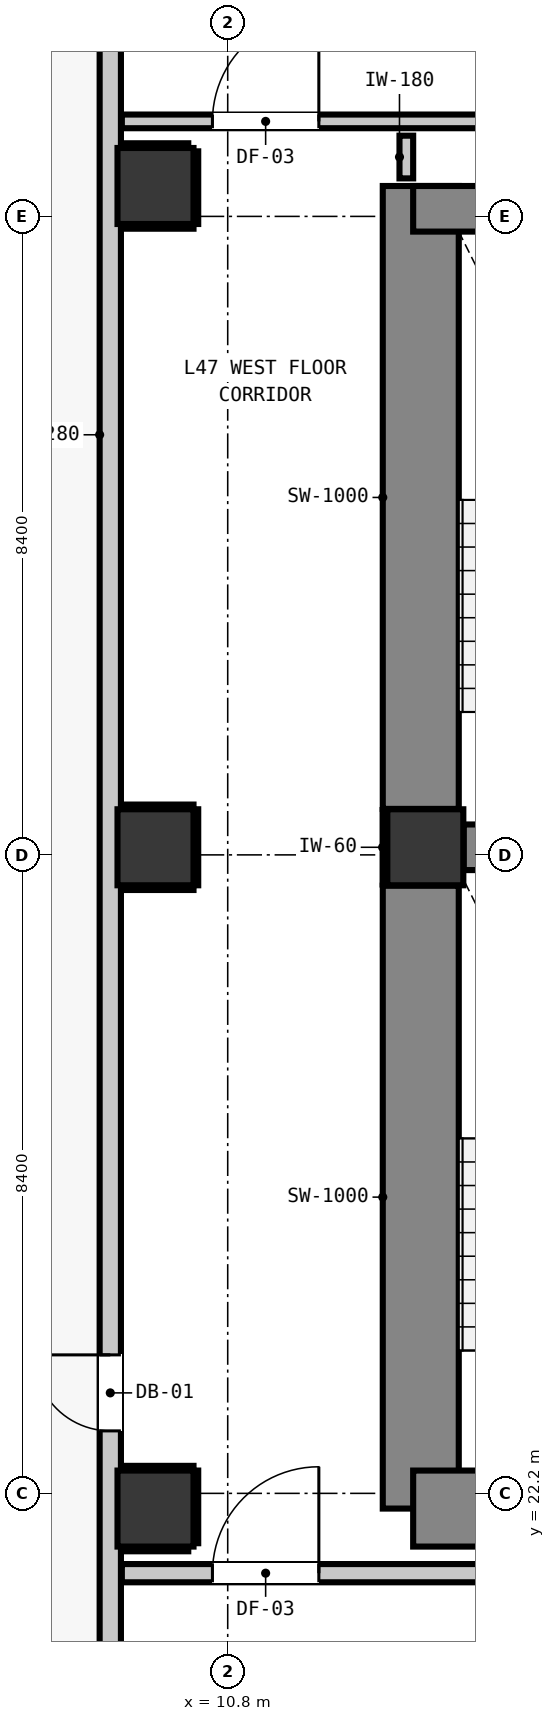
"""IFC4 building model, lengths in metres.
Left out: names, types, materials, properties, quantities, classifications, styles, units other than length and angle.
Written with IfcOpenShell. Run it as: python <this file> out.ifc"""

import sys

from ifc_helpers import new_model, si_unit, direction, frame, frame_2d, origin, origin_2d, place, context, subcontext, project, spatial, rectangle, extrude, element, fill, save


model = new_model("IFC4")
c1 = context("Model", 3, precision=1e-05, world=origin(), true_north=direction((0.0, 1.0)))
c2 = subcontext(c1, "Body", "Model", "MODEL_VIEW")
j1 = project(units=[si_unit("LENGTHUNIT", "METRE"), si_unit("PLANEANGLEUNIT", "RADIAN")], contexts=[c1])
p1 = place(None, origin())
s1 = spatial("IfcSite", under=j1, at=p1, CompositionType="ELEMENT")
p2 = place(p1, origin())
s2 = spatial("IfcBuilding", under=s1, at=p2, CompositionType="ELEMENT")
p3 = place(p2, frame((0.0, 0.0, 162.52)))
s3 = spatial("IfcBuildingStorey", under=s2, at=p3, CompositionType="ELEMENT", Elevation=162.52)
p4 = place(p3, frame((13.4, 30.7, 0.0), z_axis=(0.0, 0.0, 1.0), x_axis=(1.0, 0.0, 0.0)))
e1 = element("IfcColumn", 1, at=p4, inside=s3, PredefinedType="COLUMN", context=c2, shape_type="SweptSolid", body=[
    extrude(rectangle(XDim=1.0, YDim=1.0, at=origin_2d()), origin(), (0.0, 0.0, 1.0), 3.32),
])
p5 = place(p3, frame((13.34, 22.0, 0.0), z_axis=(0.0, 0.0, 1.0), x_axis=(0.0, 1.0, 0.0)))
e2 = element("IfcWall", 2, at=p5, inside=s3, PredefinedType="SHEAR", context=c2, shape_type="SweptSolid", body=[
    extrude(rectangle(XDim=8.195, YDim=1.0, at=frame_2d((4.098, 0.0))), origin(), (0.0, 0.0, 1.0), 3.32),
])
p6 = place(p3, frame((13.34, 31.205, 0.0), z_axis=(0.0, 0.0, 1.0), x_axis=(0.0, 1.0, 0.0)))
e3 = element("IfcWall", 3, at=p6, inside=s3, PredefinedType="SHEAR", context=c2, shape_type="SweptSolid", body=[
    extrude(rectangle(XDim=8.195, YDim=1.0, at=frame_2d((4.097, 0.0))), origin(), (0.0, 0.0, 1.0), 3.32),
])
p7 = place(p3, frame((13.24, 22.0, 0.0), z_axis=(0.0, 0.0, 1.0), x_axis=(1.0, 0.0, 0.0)))
e4 = element("IfcWall", 4, at=p7, inside=s3, PredefinedType="SHEAR", context=c2, shape_type="SweptSolid", body=[
    extrude(rectangle(XDim=4.08, YDim=1.0, at=frame_2d((2.04, 0.0))), origin(), (0.0, 0.0, 1.0), 3.32),
])
p8 = place(p3, frame((13.24, 39.1, 0.0), z_axis=(0.0, 0.0, 1.0), x_axis=(1.0, 0.0, 0.0)))
e5 = element("IfcWall", 5, at=p8, inside=s3, PredefinedType="SHEAR", context=c2, shape_type="SweptSolid", body=[
    extrude(rectangle(XDim=4.08, YDim=0.6, at=frame_2d((2.04, 0.0))), origin(), (0.0, 0.0, 1.0), 3.32),
])
p9 = place(p3, frame((13.905, 30.7, 0.0), z_axis=(0.0, 0.0, 1.0), x_axis=(1.0, 0.0, 0.0)))
e6 = element("IfcWall", 6, at=p9, inside=s3, PredefinedType="SHEAR", context=c2, shape_type="SweptSolid", body=[
    extrude(rectangle(XDim=3.415, YDim=0.6, at=frame_2d((1.708, 0.0))), origin(), (0.0, 0.0, 1.0), 3.32),
])
for number, where, z_axis, x_axis in (
    (7, (9.85, 22.0, 0.0), (0.0, 0.0, 1.0), (1.0, 0.0, 0.0)),
    (8, (9.85, 30.7, 0.0), (0.0, 0.0, 1.0), (1.0, 0.0, 0.0)),
    (9, (9.85, 39.4, 0.0), (0.0, 0.0, 1.0), (1.0, 0.0, 0.0)),
):
    element("IfcColumn", number, at=place(p3, frame(where, z_axis=z_axis, x_axis=x_axis)), inside=s3, PredefinedType="COLUMN", context=c2, shape_type="SweptSolid", body=[
        extrude(rectangle(XDim=1.0, YDim=1.0, at=origin_2d()), origin(), (0.0, 0.0, 1.0), 2.9),
    ])
p10 = place(p3, frame((9.255, 17.555, 0.0), z_axis=(0.0, 0.0, 1.0), x_axis=(0.0, 1.0, 0.0)))
e10 = element("IfcWall", 10, at=p10, inside=s3, PredefinedType="STANDARD", context=c2, shape_type="SweptSolid", body=[
    extrude(rectangle(XDim=32.29, YDim=0.28, at=frame_2d((16.145, 0.0))), origin(), (0.0, 0.0, 1.0), 2.9),
])
p11 = place(p10, frame((5.467, 0.0, 0.0)))
e11 = element("IfcOpeningElement", 11, at=p11, cuts=e10, PredefinedType="OPENING", context=c2, shape_type="SweptSolid", body=[
    extrude(rectangle(XDim=1.0, YDim=2.15, at=frame_2d((0.5, 1.075))), frame((0.0, 0.15, 0.0), z_axis=(0.0, -1.0, 0.0), x_axis=(1.0, 0.0, 0.0)), (0.0, 0.0, 1.0), 0.3),
])
p12 = place(p10, frame((0.342, 0.0, 0.85)))
e12 = element("IfcOpeningElement", 12, at=p12, cuts=e10, PredefinedType="OPENING", context=c2, shape_type="SweptSolid", body=[
    extrude(rectangle(XDim=1.2, YDim=1.8, at=frame_2d((0.6, 0.9))), frame((0.0, 0.15, 0.0), z_axis=(0.0, -1.0, 0.0), x_axis=(1.0, 0.0, 0.0)), (0.0, 0.0, 1.0), 0.3),
])
p13 = place(p10, frame((30.677, 0.0, 0.85)))
e13 = element("IfcOpeningElement", 13, at=p13, cuts=e10, PredefinedType="OPENING", context=c2, shape_type="SweptSolid", body=[
    extrude(rectangle(XDim=1.2, YDim=1.8, at=frame_2d((0.6, 0.9))), frame((0.0, 0.15, 0.0), z_axis=(0.0, -1.0, 0.0), x_axis=(1.0, 0.0, 0.0)), (0.0, 0.0, 1.0), 0.3),
])
p14 = place(p3, frame((9.407, 21.15, 0.0), z_axis=(0.0, 0.0, 1.0), x_axis=(1.0, 0.0, 0.0)))
e14 = element("IfcWall", 14, at=p14, inside=s3, PredefinedType="PARTITIONING", context=c2, shape_type="SweptSolid", body=[
    extrude(rectangle(XDim=39.386, YDim=0.24, at=frame_2d((19.693, 0.0))), origin(), (0.0, 0.0, 1.0), 2.9),
])
p15 = place(p14, frame((8.803, 0.0, 0.0)))
e15 = element("IfcOpeningElement", 15, at=p15, cuts=e14, PredefinedType="OPENING", context=c2, shape_type="SweptSolid", body=[
    extrude(rectangle(XDim=1.1, YDim=2.15, at=frame_2d((0.55, 1.075))), frame((0.0, 0.13, 0.0), z_axis=(0.0, -1.0, 0.0), x_axis=(1.0, 0.0, 0.0)), (0.0, 0.0, 1.0), 0.26),
])
p16 = place(p14, frame((1.192, 0.0, 0.0)))
e16 = element("IfcOpeningElement", 16, at=p16, cuts=e14, PredefinedType="OPENING", context=c2, shape_type="SweptSolid", body=[
    extrude(rectangle(XDim=1.4, YDim=2.15, at=frame_2d((0.7, 1.075))), frame((0.0, 0.13, 0.0), z_axis=(0.0, -1.0, 0.0), x_axis=(1.0, 0.0, 0.0)), (0.0, 0.0, 1.0), 0.26),
])
p17 = place(p14, frame((28.643, 0.0, 0.0)))
e17 = element("IfcOpeningElement", 17, at=p17, cuts=e14, PredefinedType="OPENING", context=c2, shape_type="SweptSolid", body=[
    extrude(rectangle(XDim=1.4, YDim=2.15, at=frame_2d((0.7, 1.075))), frame((0.0, 0.13, 0.0), z_axis=(0.0, -1.0, 0.0), x_axis=(1.0, 0.0, 0.0)), (0.0, 0.0, 1.0), 0.26),
])
p18 = place(p14, frame((34.394, 0.0, 0.0)))
e18 = element("IfcOpeningElement", 18, at=p18, cuts=e14, PredefinedType="OPENING", context=c2, shape_type="SweptSolid", body=[
    extrude(rectangle(XDim=0.9, YDim=2.1, at=frame_2d((0.45, 1.05))), frame((0.0, 0.13, 0.0), z_axis=(0.0, -1.0, 0.0), x_axis=(1.0, 0.0, 0.0)), (0.0, 0.0, 1.0), 0.26),
])
p19 = place(p3, frame((9.407, 40.25, 0.0), z_axis=(0.0, 0.0, 1.0), x_axis=(1.0, 0.0, 0.0)))
e19 = element("IfcWall", 19, at=p19, inside=s3, PredefinedType="PARTITIONING", context=c2, shape_type="SweptSolid", body=[
    extrude(rectangle(XDim=39.386, YDim=0.18, at=frame_2d((19.693, 0.0))), origin(), (0.0, 0.0, 1.0), 2.9),
])
p20 = place(p19, frame((8.028, 0.0, 0.0)))
e20 = element("IfcOpeningElement", 20, at=p20, cuts=e19, PredefinedType="OPENING", context=c2, shape_type="SweptSolid", body=[
    extrude(rectangle(XDim=1.4, YDim=2.15, at=frame_2d((0.7, 1.075))), frame((0.0, 0.1, 0.0), z_axis=(0.0, -1.0, 0.0), x_axis=(1.0, 0.0, 0.0)), (0.0, 0.0, 1.0), 0.2),
])
p21 = place(p19, frame((1.192, 0.0, 0.0)))
e21 = element("IfcOpeningElement", 21, at=p21, cuts=e19, PredefinedType="OPENING", context=c2, shape_type="SweptSolid", body=[
    extrude(rectangle(XDim=1.4, YDim=2.15, at=frame_2d((0.7, 1.075))), frame((0.0, 0.1, 0.0), z_axis=(0.0, -1.0, 0.0), x_axis=(1.0, 0.0, 0.0)), (0.0, 0.0, 1.0), 0.2),
])
p22 = place(p19, frame((28.643, 0.0, 0.0)))
e22 = element("IfcOpeningElement", 22, at=p22, cuts=e19, PredefinedType="OPENING", context=c2, shape_type="SweptSolid", body=[
    extrude(rectangle(XDim=1.4, YDim=2.15, at=frame_2d((0.7, 1.075))), frame((0.0, 0.1, 0.0), z_axis=(0.0, -1.0, 0.0), x_axis=(1.0, 0.0, 0.0)), (0.0, 0.0, 1.0), 0.2),
])
p23 = place(p19, frame((34.394, 0.0, 0.0)))
e23 = element("IfcOpeningElement", 23, at=p23, cuts=e19, PredefinedType="OPENING", context=c2, shape_type="SweptSolid", body=[
    extrude(rectangle(XDim=0.9, YDim=2.1, at=frame_2d((0.45, 1.05))), frame((0.0, 0.1, 0.0), z_axis=(0.0, -1.0, 0.0), x_axis=(1.0, 0.0, 0.0)), (0.0, 0.0, 1.0), 0.2),
])
p24 = place(p3, frame((13.15, 39.5, 0.0), z_axis=(0.0, 0.0, 1.0), x_axis=(0.0, 1.0, 0.0)))
e24 = element("IfcWall", 24, at=p24, inside=s3, PredefinedType="PARTITIONING", context=c2, shape_type="SweptSolid", body=[
    extrude(rectangle(XDim=0.562, YDim=0.18, at=frame_2d((0.281, 0.0))), origin(), (0.0, 0.0, 1.0), 0.905),
])
p25 = place(p3, frame((12.868, 30.21, 0.0), z_axis=(0.0, 0.0, 1.0), x_axis=(0.0, 1.0, 0.0)))
e25 = element("IfcWall", 25, at=p25, inside=s3, PredefinedType="PARTITIONING", context=c2, shape_type="SweptSolid", body=[
    extrude(rectangle(XDim=0.98, YDim=0.06, at=frame_2d((0.49, 0.0))), origin(), (0.0, 0.0, 1.0), 0.905),
])
p26 = place(p3, frame((9.41, 21.468, 0.0), z_axis=(0.0, 0.0, 1.0), x_axis=(1.0, 0.0, 0.0)))
e26 = element("IfcWall", 26, at=p26, inside=s3, PredefinedType="PARTITIONING", context=c2, shape_type="SweptSolid", body=[
    extrude(rectangle(XDim=0.871, YDim=0.06, at=frame_2d((0.436, 0.0))), origin(), (0.0, 0.0, 1.0), 0.905),
])
p27 = place(p3, frame((9.41, 22.532, 0.0), z_axis=(0.0, 0.0, 1.0), x_axis=(1.0, 0.0, 0.0)))
e27 = element("IfcWall", 27, at=p27, inside=s3, PredefinedType="PARTITIONING", context=c2, shape_type="SweptSolid", body=[
    extrude(rectangle(XDim=0.94, YDim=0.06, at=frame_2d((0.47, 0.0))), origin(), (0.0, 0.0, 1.0), 0.905),
])
p28 = place(p3, frame((10.382, 21.544, 0.0), z_axis=(0.0, 0.0, 1.0), x_axis=(0.0, 1.0, 0.0)))
e28 = element("IfcWall", 28, at=p28, inside=s3, PredefinedType="PARTITIONING", context=c2, shape_type="SweptSolid", body=[
    extrude(rectangle(XDim=0.956, YDim=0.06, at=frame_2d((0.478, 0.0))), origin(), (0.0, 0.0, 1.0), 1.45),
])
for number, where, z_axis, x_axis in (
    (29, (9.41, 30.168, 0.0), (0.0, 0.0, 1.0), (1.0, 0.0, 0.0)),
    (30, (9.41, 31.232, 0.0), (0.0, 0.0, 1.0), (1.0, 0.0, 0.0)),
):
    element("IfcWall", number, at=place(p3, frame(where, z_axis=z_axis, x_axis=x_axis)), inside=s3, PredefinedType="PARTITIONING", context=c2, shape_type="SweptSolid", body=[
        extrude(rectangle(XDim=0.94, YDim=0.06, at=frame_2d((0.47, 0.0))), origin(), (0.0, 0.0, 1.0), 0.905),
    ])
p29 = place(p3, frame((10.382, 30.2, 0.0), z_axis=(0.0, 0.0, 1.0), x_axis=(0.0, 1.0, 0.0)))
e31 = element("IfcWall", 31, at=p29, inside=s3, PredefinedType="PARTITIONING", context=c2, shape_type="SweptSolid", body=[
    extrude(rectangle(XDim=1.0, YDim=0.06, at=frame_2d((0.5, 0.0))), origin(), (0.0, 0.0, 1.0), 1.45),
])
p30 = place(p3, frame((9.41, 38.868, 0.0), z_axis=(0.0, 0.0, 1.0), x_axis=(1.0, 0.0, 0.0)))
e32 = element("IfcWall", 32, at=p30, inside=s3, PredefinedType="PARTITIONING", context=c2, shape_type="SweptSolid", body=[
    extrude(rectangle(XDim=0.94, YDim=0.06, at=frame_2d((0.47, 0.0))), origin(), (0.0, 0.0, 1.0), 0.905),
])
p31 = place(p3, frame((9.41, 39.932, 0.0), z_axis=(0.0, 0.0, 1.0), x_axis=(1.0, 0.0, 0.0)))
e33 = element("IfcWall", 33, at=p31, inside=s3, PredefinedType="PARTITIONING", context=c2, shape_type="SweptSolid", body=[
    extrude(rectangle(XDim=0.871, YDim=0.06, at=frame_2d((0.436, 0.0))), origin(), (0.0, 0.0, 1.0), 0.905),
])
p32 = place(p3, frame((10.382, 38.9, 0.0), z_axis=(0.0, 0.0, 1.0), x_axis=(0.0, 1.0, 0.0)))
e34 = element("IfcWall", 34, at=p32, inside=s3, PredefinedType="PARTITIONING", context=c2, shape_type="SweptSolid", body=[
    extrude(rectangle(XDim=0.956, YDim=0.06, at=frame_2d((0.478, 0.0))), origin(), (0.0, 0.0, 1.0), 1.45),
])
p33 = place(p11, origin())
e35 = element("IfcDoor", 35, at=p33, inside=s3, OperationType="SINGLE_SWING_RIGHT", PredefinedType="DOOR", context=c2, shape_type="SweptSolid", body=[
    extrude(rectangle(XDim=1.0, YDim=2.15, at=frame_2d((0.5, 1.075))), frame((0.0, 0.025, 0.0), z_axis=(0.0, -1.0, 0.0), x_axis=(1.0, 0.0, 0.0)), (0.0, 0.0, 1.0), 0.05),
])
fill(e11, e35)
p34 = place(p16, origin())
e36 = element("IfcDoor", 36, at=p34, inside=s3, OperationType="SINGLE_SWING_RIGHT", PredefinedType="DOOR", context=c2, shape_type="SweptSolid", body=[
    extrude(rectangle(XDim=1.4, YDim=2.15, at=frame_2d((0.7, 1.075))), frame((0.0, 0.025, 0.0), z_axis=(0.0, -1.0, 0.0), x_axis=(1.0, 0.0, 0.0)), (0.0, 0.0, 1.0), 0.05),
])
fill(e16, e36)
p35 = place(p21, origin())
e37 = element("IfcDoor", 37, at=p35, inside=s3, OperationType="SINGLE_SWING_RIGHT", PredefinedType="DOOR", context=c2, shape_type="SweptSolid", body=[
    extrude(rectangle(XDim=1.4, YDim=2.15, at=frame_2d((0.7, 1.075))), frame((0.0, 0.025, 0.0), z_axis=(0.0, -1.0, 0.0), x_axis=(1.0, 0.0, 0.0)), (0.0, 0.0, 1.0), 0.05),
])
fill(e21, e37)
save(model, sys.argv[1])
